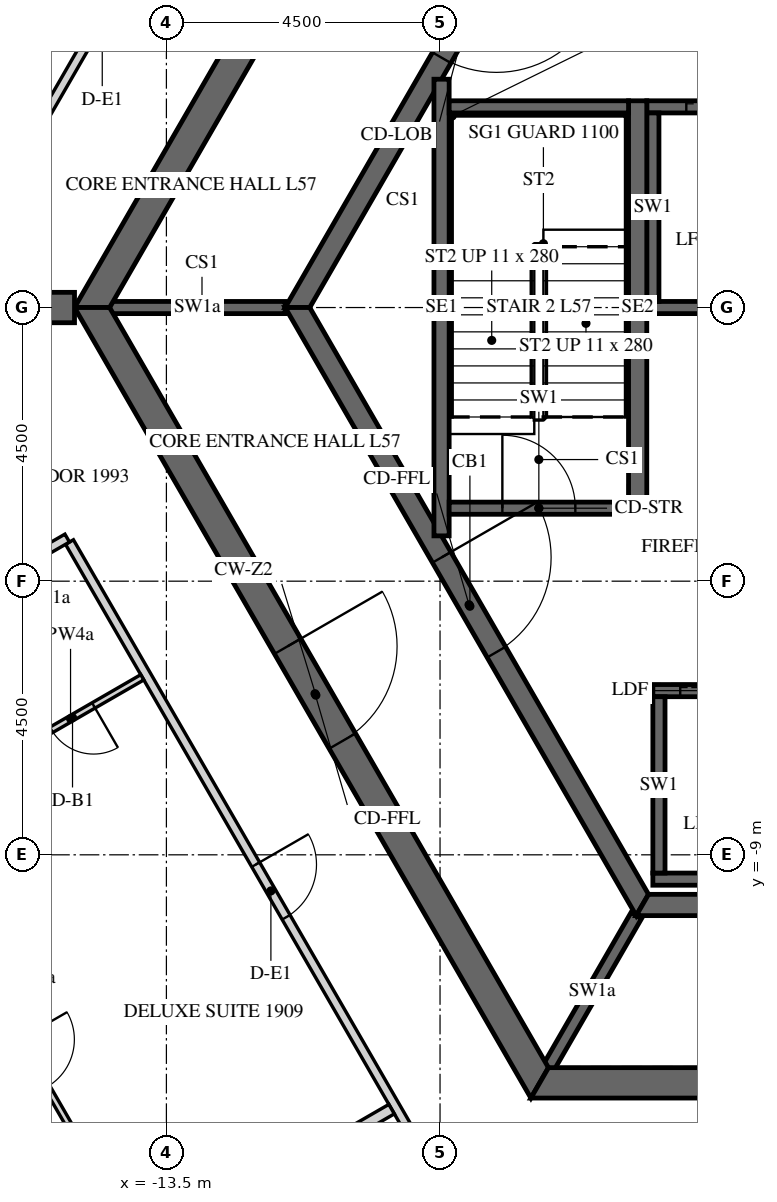
"""IFC4 building model, lengths in metres.
Left out: names, types, materials, properties, quantities, classifications, styles, units other than length and angle.
Written with IfcOpenShell. Run it as: python <this file> out.ifc"""

import sys

from ifc_helpers import new_model, si_unit, direction, frame, frame_2d, origin, place, context, subcontext, project, spatial, polyline, rectangle, outline, extrude, element, fill, save


model = new_model("IFC4")
c1 = context("Model", 3, precision=1e-05, world=origin(), true_north=direction((0.0, 1.0)))
c2 = subcontext(c1, "Body", "Model", "MODEL_VIEW")
j1 = project(units=[si_unit("LENGTHUNIT", "METRE"), si_unit("PLANEANGLEUNIT", "RADIAN")], contexts=[c1])
p1 = place(None, origin())
s1 = spatial("IfcSite", under=j1, at=p1, CompositionType="ELEMENT")
p2 = place(p1, origin())
s2 = spatial("IfcBuilding", under=s1, at=p2, CompositionType="ELEMENT")
p3 = place(p2, frame((0.0, 0.0, 238.5)))
s3 = spatial("IfcBuildingStorey", under=s2, at=p3, CompositionType="ELEMENT", Elevation=238.5)
p4 = place(p3, frame((-7.361, 12.75, -0.15), z_axis=(0.0, 0.0, 1.0), x_axis=(-0.50000571537, -0.866022103989, 0.0)))
e1 = element("IfcWall", 1, at=p4, inside=s3, PredefinedType="SHEAR", context=c2, shape_type="SweptSolid", body=[
    extrude(outline(polyline([(-0.144, -0.25), (14.867, -0.25), (14.578, 0.25), (0.144, 0.25), (-0.144, -0.25)])), origin(), (0.0, 0.0, 1.0), 3.9),
])
p5 = place(p4, frame((6.49, 0.0, 0.15)))
e2 = element("IfcOpeningElement", 2, at=p5, cuts=e1, PredefinedType="OPENING", context=c2, shape_type="SweptSolid", body=[
    extrude(rectangle(XDim=1.8, YDim=2.4, at=frame_2d((0.9, 1.2))), frame((0.0, 0.26, 0.0), z_axis=(0.0, -1.0, 0.0), x_axis=(1.0, 0.0, 0.0)), (0.0, 0.0, 1.0), 0.52),
])
p6 = place(p3, frame((-14.722, 0.0, -0.15), z_axis=(0.0, 0.0, 1.0), x_axis=(0.50000571537, -0.866022103989, 0.0)))
e3 = element("IfcWall", 3, at=p6, inside=s3, PredefinedType="SHEAR", context=c2, shape_type="SweptSolid", body=[
    extrude(outline(polyline([(-0.144, -0.25), (14.867, -0.25), (14.578, 0.25), (0.144, 0.25), (-0.144, -0.25)])), origin(), (0.0, 0.0, 1.0), 3.9),
])
p7 = place(p6, frame((6.432, 0.0, 0.15)))
e4 = element("IfcOpeningElement", 4, at=p7, cuts=e3, PredefinedType="OPENING", context=c2, shape_type="SweptSolid", body=[
    extrude(rectangle(XDim=1.8, YDim=2.4, at=frame_2d((0.9, 1.2))), frame((0.0, 0.26, 0.0), z_axis=(0.0, -1.0, 0.0), x_axis=(1.0, 0.0, 0.0)), (0.0, 0.0, 1.0), 0.52),
])
p8 = place(p3, frame((-7.361, -12.75, -0.15), z_axis=(0.0, 0.0, 1.0), x_axis=(1.0, 0.0, 0.0)))
e5 = element("IfcWall", 5, at=p8, inside=s3, PredefinedType="SHEAR", context=c2, shape_type="SweptSolid", body=[
    extrude(outline(polyline([(-0.144, -0.25), (14.866, -0.25), (14.578, 0.25), (0.144, 0.25), (-0.144, -0.25)])), origin(), (0.0, 0.0, 1.0), 3.9),
])
p9 = place(p8, frame((6.761, 0.0, 0.15)))
e6 = element("IfcOpeningElement", 6, at=p9, cuts=e5, PredefinedType="OPENING", context=c2, shape_type="SweptSolid", body=[
    extrude(rectangle(XDim=1.2, YDim=2.4, at=frame_2d((0.6, 1.2))), frame((0.0, 0.26, 0.0), z_axis=(0.0, -1.0, 0.0), x_axis=(1.0, 0.0, 0.0)), (0.0, 0.0, 1.0), 0.52),
])
p10 = place(p3, frame((-15.011, 0.0, -0.15), z_axis=(0.0, 0.0, 1.0), x_axis=(-1.0, 0.0, 0.0)))
e7 = element("IfcWall", 7, at=p10, inside=s3, PredefinedType="SHEAR", context=c2, shape_type="SweptSolid", body=[
    extrude(rectangle(XDim=15.424, YDim=0.5, at=frame_2d((7.712, 0.0))), origin(), (0.0, 0.0, 1.0), 3.9),
])
p11 = place(p10, frame((6.812, 0.0, 0.15)))
e8 = element("IfcOpeningElement", 8, at=p11, cuts=e7, PredefinedType="OPENING", context=c2, shape_type="SweptSolid", body=[
    extrude(rectangle(XDim=1.8, YDim=2.4, at=frame_2d((0.9, 1.2))), frame((0.0, 0.26, 0.0), z_axis=(0.0, -1.0, 0.0), x_axis=(1.0, 0.0, 0.0)), (0.0, 0.0, 1.0), 0.52),
])
p12 = place(p3, frame((-5.673, 9.825, -0.15), z_axis=(0.0, 0.0, 1.0), x_axis=(-0.499995046907, -0.866028263435, 0.0)))
e9 = element("IfcWall", 9, at=p12, inside=s3, PredefinedType="SHEAR", context=c2, shape_type="SweptSolid", body=[
    extrude(outline(polyline([(-0.101, -0.175), (11.446, -0.175), (11.244, 0.175), (0.101, 0.175), (-0.101, -0.175)])), origin(), (0.0, 0.0, 1.0), 3.9),
])
p13 = place(p12, frame((4.801, 0.0, 0.15)))
e10 = element("IfcOpeningElement", 10, at=p13, cuts=e9, PredefinedType="OPENING", context=c2, shape_type="SweptSolid", body=[
    extrude(rectangle(XDim=1.8, YDim=2.4, at=frame_2d((0.9, 1.2))), frame((0.0, 0.185, 0.0), z_axis=(0.0, -1.0, 0.0), x_axis=(1.0, 0.0, 0.0)), (0.0, 0.0, 1.0), 0.37),
])
p14 = place(p3, frame((-11.345, 0.0, -0.15), z_axis=(0.0, 0.0, 1.0), x_axis=(0.499995046907, -0.866028263435, 0.0)))
e11 = element("IfcWall", 11, at=p14, inside=s3, PredefinedType="SHEAR", context=c2, shape_type="SweptSolid", body=[
    extrude(outline(polyline([(-0.101, -0.175), (11.446, -0.175), (11.244, 0.175), (0.101, 0.175), (-0.101, -0.175)])), origin(), (0.0, 0.0, 1.0), 3.9),
])
p15 = place(p14, frame((4.744, 0.0, 0.15)))
e12 = element("IfcOpeningElement", 12, at=p15, cuts=e11, PredefinedType="OPENING", context=c2, shape_type="SweptSolid", body=[
    extrude(rectangle(XDim=1.8, YDim=2.4, at=frame_2d((0.9, 1.2))), frame((0.0, 0.185, 0.0), z_axis=(0.0, -1.0, 0.0), x_axis=(1.0, 0.0, 0.0)), (0.0, 0.0, 1.0), 0.37),
])
p16 = place(p3, frame((-5.673, -9.825, -0.15), z_axis=(0.0, 0.0, 1.0), x_axis=(1.0, 0.0, 0.0)))
e13 = element("IfcWall", 13, at=p16, inside=s3, PredefinedType="SHEAR", context=c2, shape_type="SweptSolid", body=[
    extrude(outline(polyline([(-0.101, -0.175), (11.446, -0.175), (11.244, 0.175), (0.101, 0.175), (-0.101, -0.175)])), origin(), (0.0, 0.0, 1.0), 3.9),
])
p17 = place(p3, frame((-5.6, 3.3, -0.25), z_axis=(0.0, 0.0, 1.0), x_axis=(1.0, 0.0, 0.0)))
e14 = element("IfcWall", 14, at=p17, inside=s3, PredefinedType="SHEAR", context=c2, shape_type="SweptSolid", body=[
    extrude(rectangle(XDim=11.2, YDim=0.2, at=frame_2d((5.6, 0.0))), origin(), (0.0, 0.0, 1.0), 3.9),
])
p18 = place(p17, frame((0.65, 0.0, 0.25)))
e15 = element("IfcOpeningElement", 15, at=p18, cuts=e14, PredefinedType="OPENING", context=c2, shape_type="SweptSolid", body=[
    extrude(rectangle(XDim=1.1, YDim=2.1, at=frame_2d((0.55, 1.05))), frame((0.0, 0.11, 0.0), z_axis=(0.0, -1.0, 0.0), x_axis=(1.0, 0.0, 0.0)), (0.0, 0.0, 1.0), 0.22),
])
p19 = place(p17, frame((2.85, 0.0, 0.25)))
e16 = element("IfcOpeningElement", 16, at=p19, cuts=e14, PredefinedType="OPENING", context=c2, shape_type="SweptSolid", body=[
    extrude(rectangle(XDim=1.1, YDim=2.1, at=frame_2d((0.55, 1.05))), frame((0.0, 0.11, 0.0), z_axis=(0.0, -1.0, 0.0), x_axis=(1.0, 0.0, 0.0)), (0.0, 0.0, 1.0), 0.22),
])
p20 = place(p17, frame((5.05, 0.0, 0.25)))
e17 = element("IfcOpeningElement", 17, at=p20, cuts=e14, PredefinedType="OPENING", context=c2, shape_type="SweptSolid", body=[
    extrude(rectangle(XDim=1.1, YDim=2.1, at=frame_2d((0.55, 1.05))), frame((0.0, 0.11, 0.0), z_axis=(0.0, -1.0, 0.0), x_axis=(1.0, 0.0, 0.0)), (0.0, 0.0, 1.0), 0.22),
])
p21 = place(p17, frame((7.25, 0.0, 0.25)))
e18 = element("IfcOpeningElement", 18, at=p21, cuts=e14, PredefinedType="OPENING", context=c2, shape_type="SweptSolid", body=[
    extrude(rectangle(XDim=1.1, YDim=2.1, at=frame_2d((0.55, 1.05))), frame((0.0, 0.11, 0.0), z_axis=(0.0, -1.0, 0.0), x_axis=(1.0, 0.0, 0.0)), (0.0, 0.0, 1.0), 0.22),
])
p22 = place(p17, frame((9.45, 0.0, 0.25)))
e19 = element("IfcOpeningElement", 19, at=p22, cuts=e14, PredefinedType="OPENING", context=c2, shape_type="SweptSolid", body=[
    extrude(rectangle(XDim=1.1, YDim=2.1, at=frame_2d((0.55, 1.05))), frame((0.0, 0.11, 0.0), z_axis=(0.0, -1.0, 0.0), x_axis=(1.0, 0.0, 0.0)), (0.0, 0.0, 1.0), 0.22),
])
p23 = place(p3, frame((-5.6, 0.0, -0.25), z_axis=(0.0, 0.0, 1.0), x_axis=(1.0, 0.0, 0.0)))
e20 = element("IfcWall", 20, at=p23, inside=s3, PredefinedType="SHEAR", context=c2, shape_type="SweptSolid", body=[
    extrude(rectangle(XDim=11.2, YDim=0.2, at=frame_2d((5.6, 0.0))), origin(), (0.0, 0.0, 1.0), 3.9),
])
p24 = place(p3, frame((-5.5, 0.1, -0.25), z_axis=(0.0, 0.0, 1.0), x_axis=(0.0, 1.0, 0.0)))
e21 = element("IfcWall", 21, at=p24, inside=s3, PredefinedType="SHEAR", context=c2, shape_type="SweptSolid", body=[
    extrude(rectangle(XDim=3.1, YDim=0.2, at=frame_2d((1.55, 0.0))), origin(), (0.0, 0.0, 1.0), 3.9),
])
p25 = place(p3, frame((-5.5, -6.3, -0.25), z_axis=(0.0, 0.0, 1.0), x_axis=(1.0, 0.0, 0.0)))
e22 = element("IfcWall", 22, at=p25, inside=s3, PredefinedType="SHEAR", context=c2, shape_type="SweptSolid", body=[
    extrude(rectangle(XDim=9.2, YDim=0.2, at=frame_2d((4.6, 0.0))), origin(), (0.0, 0.0, 1.0), 3.9),
])
p26 = place(p25, frame((0.45, 0.0, 0.25)))
e23 = element("IfcOpeningElement", 23, at=p26, cuts=e22, PredefinedType="OPENING", context=c2, shape_type="SweptSolid", body=[
    extrude(rectangle(XDim=1.1, YDim=2.1, at=frame_2d((0.55, 1.05))), frame((0.0, 0.11, 0.0), z_axis=(0.0, -1.0, 0.0), x_axis=(1.0, 0.0, 0.0)), (0.0, 0.0, 1.0), 0.22),
])
p27 = place(p25, frame((2.25, 0.0, 0.25)))
e24 = element("IfcOpeningElement", 24, at=p27, cuts=e22, PredefinedType="OPENING", context=c2, shape_type="SweptSolid", body=[
    extrude(rectangle(XDim=1.1, YDim=2.1, at=frame_2d((0.55, 1.05))), frame((0.0, 0.11, 0.0), z_axis=(0.0, -1.0, 0.0), x_axis=(1.0, 0.0, 0.0)), (0.0, 0.0, 1.0), 0.22),
])
p28 = place(p25, frame((4.05, 0.0, 0.25)))
e25 = element("IfcOpeningElement", 25, at=p28, cuts=e22, PredefinedType="OPENING", context=c2, shape_type="SweptSolid", body=[
    extrude(rectangle(XDim=1.1, YDim=2.1, at=frame_2d((0.55, 1.05))), frame((0.0, 0.11, 0.0), z_axis=(0.0, -1.0, 0.0), x_axis=(1.0, 0.0, 0.0)), (0.0, 0.0, 1.0), 0.22),
])
p29 = place(p25, frame((5.85, 0.0, 0.25)))
e26 = element("IfcOpeningElement", 26, at=p29, cuts=e22, PredefinedType="OPENING", context=c2, shape_type="SweptSolid", body=[
    extrude(rectangle(XDim=1.1, YDim=2.1, at=frame_2d((0.55, 1.05))), frame((0.0, 0.11, 0.0), z_axis=(0.0, -1.0, 0.0), x_axis=(1.0, 0.0, 0.0)), (0.0, 0.0, 1.0), 0.22),
])
p30 = place(p25, frame((7.65, 0.0, 0.25)))
e27 = element("IfcOpeningElement", 27, at=p30, cuts=e22, PredefinedType="OPENING", context=c2, shape_type="SweptSolid", body=[
    extrude(rectangle(XDim=1.1, YDim=2.1, at=frame_2d((0.55, 1.05))), frame((0.0, 0.11, 0.0), z_axis=(0.0, -1.0, 0.0), x_axis=(1.0, 0.0, 0.0)), (0.0, 0.0, 1.0), 0.22),
])
p31 = place(p3, frame((-5.5, -9.4, -0.25), z_axis=(0.0, 0.0, 1.0), x_axis=(1.0, 0.0, 0.0)))
e28 = element("IfcWall", 28, at=p31, inside=s3, PredefinedType="SHEAR", context=c2, shape_type="SweptSolid", body=[
    extrude(rectangle(XDim=9.2, YDim=0.2, at=frame_2d((4.6, 0.0))), origin(), (0.0, 0.0, 1.0), 3.9),
])
p32 = place(p3, frame((-5.4, -9.3, -0.25), z_axis=(0.0, 0.0, 1.0), x_axis=(0.0, 1.0, 0.0)))
e29 = element("IfcWall", 29, at=p32, inside=s3, PredefinedType="SHEAR", context=c2, shape_type="SweptSolid", body=[
    extrude(rectangle(XDim=2.9, YDim=0.2, at=frame_2d((1.45, 0.0))), origin(), (0.0, 0.0, 1.0), 3.9),
])
for number, where, z_axis, x_axis in (
    (30, (-11.547, 0.0, -0.15), (0.0, 0.0, 1.0), (-1.0, 0.0, 0.0)),
    (31, (-5.773, -10.0, -0.15), (0.0, 0.0, 1.0), (-0.5, -0.866, 0.0)),
):
    element("IfcWall", number, at=place(p3, frame(where, z_axis=z_axis, x_axis=x_axis)), inside=s3, PredefinedType="SHEAR", context=c2, shape_type="SweptSolid", body=[
        extrude(rectangle(XDim=2.887, YDim=0.2, at=frame_2d((1.443, 0.0))), origin(), (0.0, 0.0, 1.0), 3.9),
    ])
p33 = place(p3, frame((-5.75, -3.4, -0.25), z_axis=(0.0, 0.0, 1.0), x_axis=(0.0, 1.0, 0.0)))
e32 = element("IfcWall", 32, at=p33, inside=s3, PredefinedType="SHEAR", context=c2, shape_type="SweptSolid", body=[
    extrude(rectangle(XDim=6.8, YDim=0.3, at=frame_2d((3.4, 0.0))), origin(), (0.0, 0.0, 1.0), 3.9),
])
p34 = place(p3, frame((-8.975, -3.755, -0.25), z_axis=(0.0, 0.0, 1.0), x_axis=(0.0, 1.0, 0.0)))
e33 = element("IfcWall", 33, at=p34, inside=s3, PredefinedType="SHEAR", context=c2, shape_type="SweptSolid", body=[
    extrude(rectangle(XDim=7.51, YDim=0.25, at=frame_2d((3.755, 0.0))), origin(), (0.0, 0.0, 1.0), 3.9),
])
p35 = place(p3, frame((-8.85, 3.3, -0.25), z_axis=(0.0, 0.0, 1.0), x_axis=(1.0, 0.0, 0.0)))
e34 = element("IfcWall", 34, at=p35, inside=s3, PredefinedType="SHEAR", context=c2, shape_type="SweptSolid", body=[
    extrude(rectangle(XDim=2.95, YDim=0.2, at=frame_2d((1.475, 0.0))), origin(), (0.0, 0.0, 1.0), 3.9),
])
p36 = place(p3, frame((-8.85, -3.3, -0.25), z_axis=(0.0, 0.0, 1.0), x_axis=(1.0, 0.0, 0.0)))
e35 = element("IfcWall", 35, at=p36, inside=s3, PredefinedType="SHEAR", context=c2, shape_type="SweptSolid", body=[
    extrude(rectangle(XDim=2.95, YDim=0.2, at=frame_2d((1.475, 0.0))), origin(), (0.0, 0.0, 1.0), 3.9),
])
p37 = place(p36, frame((0.875, 0.0, 0.25)))
e36 = element("IfcOpeningElement", 36, at=p37, cuts=e35, PredefinedType="OPENING", context=c2, shape_type="SweptSolid", body=[
    extrude(rectangle(XDim=1.2, YDim=2.4, at=frame_2d((0.6, 1.2))), frame((0.0, 0.11, 0.0), z_axis=(0.0, -1.0, 0.0), x_axis=(1.0, 0.0, 0.0)), (0.0, 0.0, 1.0), 0.22),
])
p38 = place(p3, frame((-8.673, 14.978, 0.0), z_axis=(0.0, 0.0, 1.0), x_axis=(-0.50000700621, -0.86602135871, 0.0)))
e37 = element("IfcWall", 37, at=p38, inside=s3, PredefinedType="PARTITIONING", context=c2, shape_type="SweptSolid", body=[
    extrude(rectangle(XDim=14.928, YDim=0.15, at=frame_2d((7.464, 0.0))), origin(), (0.0, 0.0, 1.0), 2.838),
])
p39 = place(p38, frame((4.454, 0.0, 0.0)))
e38 = element("IfcOpeningElement", 38, at=p39, cuts=e37, PredefinedType="OPENING", context=c2, shape_type="SweptSolid", body=[
    extrude(rectangle(XDim=1.0, YDim=2.1, at=frame_2d((0.5, 1.05))), frame((0.0, 0.085, 0.0), z_axis=(0.0, -1.0, 0.0), x_axis=(1.0, 0.0, 0.0)), (0.0, 0.0, 1.0), 0.17),
])
p40 = place(p38, frame((11.264, 0.0, 0.0)))
e39 = element("IfcOpeningElement", 39, at=p40, cuts=e37, PredefinedType="OPENING", context=c2, shape_type="SweptSolid", body=[
    extrude(rectangle(XDim=1.0, YDim=2.1, at=frame_2d((0.5, 1.05))), frame((0.0, 0.085, 0.0), z_axis=(0.0, -1.0, 0.0), x_axis=(1.0, 0.0, 0.0)), (0.0, 0.0, 1.0), 0.17),
])
p41 = place(p3, frame((-15.094, -3.856, 0.0), z_axis=(0.0, 0.0, 1.0), x_axis=(0.500006037985, -0.866021917724, 0.0)))
e40 = element("IfcWall", 40, at=p41, inside=s3, PredefinedType="PARTITIONING", context=c2, shape_type="SweptSolid", body=[
    extrude(rectangle(XDim=12.867, YDim=0.15, at=frame_2d((6.434, 0.0))), origin(), (0.0, 0.0, 1.0), 2.838),
])
p42 = place(p41, frame((6.125, 0.0, 0.0)))
e41 = element("IfcOpeningElement", 41, at=p42, cuts=e40, PredefinedType="OPENING", context=c2, shape_type="SweptSolid", body=[
    extrude(rectangle(XDim=1.0, YDim=2.1, at=frame_2d((0.5, 1.05))), frame((0.0, 0.085, 0.0), z_axis=(0.0, -1.0, 0.0), x_axis=(1.0, 0.0, 0.0)), (0.0, 0.0, 1.0), 0.17),
])
p43 = place(p3, frame((-16.49, -4.576, 0.0), z_axis=(0.0, 0.0, 1.0), x_axis=(0.865993845424, 0.5000546567, 0.0)))
e42 = element("IfcWall", 42, at=p43, inside=s3, PredefinedType="PARTITIONING", context=c2, shape_type="SweptSolid", body=[
    extrude(rectangle(XDim=1.569, YDim=0.15, at=frame_2d((0.785, 0.0))), origin(), (0.0, 0.0, 1.0), 2.838),
])
p44 = place(p3, frame((-13.896, -6.081, 0.0), z_axis=(0.0, 0.0, 1.0), x_axis=(-0.866012511928, -0.500022328685, 0.0)))
e43 = element("IfcWall", 43, at=p44, inside=s3, PredefinedType="PARTITIONING", context=c2, shape_type="SweptSolid", body=[
    extrude(rectangle(XDim=2.725, YDim=0.1, at=frame_2d((1.363, 0.0))), origin(), (0.0, 0.0, 1.0), 2.838),
])
p45 = place(p44, frame((0.925, 0.0, 0.0)))
e44 = element("IfcOpeningElement", 44, at=p45, cuts=e43, PredefinedType="OPENING", context=c2, shape_type="SweptSolid", body=[
    extrude(rectangle(XDim=0.8, YDim=2.1, at=frame_2d((0.4, 1.05))), frame((0.0, 0.06, 0.0), z_axis=(0.0, -1.0, 0.0), x_axis=(1.0, 0.0, 0.0)), (0.0, 0.0, 1.0), 0.12),
])
p46 = place(p3, frame((-17.463, -9.353, 0.0), z_axis=(0.0, 0.0, 1.0), x_axis=(0.499995846692, -0.866027801685, 0.0)))
e45 = element("IfcWall", 45, at=p46, inside=s3, PredefinedType="PARTITIONING", context=c2, shape_type="SweptSolid", body=[
    extrude(rectangle(XDim=7.06, YDim=0.1, at=frame_2d((3.53, 0.0))), origin(), (0.0, 0.0, 1.0), 2.838),
])
p47 = place(p46, frame((3.1, 0.0, 0.0)))
e46 = element("IfcOpeningElement", 46, at=p47, cuts=e45, PredefinedType="OPENING", context=c2, shape_type="SweptSolid", body=[
    extrude(rectangle(XDim=0.9, YDim=2.1, at=frame_2d((0.45, 1.05))), frame((0.0, 0.06, 0.0), z_axis=(0.0, -1.0, 0.0), x_axis=(1.0, 0.0, 0.0)), (0.0, 0.0, 1.0), 0.12),
])
p48 = place(p3, frame((-20.513, -19.37, 0.0), z_axis=(0.0, 0.0, 1.0), x_axis=(0.866024931941, 0.500000817256, 0.0)))
e47 = element("IfcWall", 47, at=p48, inside=s3, PredefinedType="PARTITIONING", context=c2, shape_type="SweptSolid", body=[
    extrude(rectangle(XDim=12.375, YDim=0.18, at=frame_2d((6.188, 0.0))), origin(), (0.0, 0.0, 1.0), 2.838),
])
p49 = place(p7, origin())
e48 = element("IfcDoor", 48, at=p49, inside=s3, OperationType="DOUBLE_DOOR_SINGLE_SWING", PredefinedType="DOOR", context=c2, shape_type="SweptSolid", body=[
    extrude(rectangle(XDim=1.8, YDim=2.4, at=frame_2d((0.9, 1.2))), frame((0.0, 0.025, 0.0), z_axis=(0.0, -1.0, 0.0), x_axis=(1.0, 0.0, 0.0)), (0.0, 0.0, 1.0), 0.05),
])
fill(e4, e48)
p50 = place(p13, origin())
e49 = element("IfcDoor", 49, at=p50, inside=s3, OperationType="DOUBLE_DOOR_SINGLE_SWING", PredefinedType="DOOR", context=c2, shape_type="SweptSolid", body=[
    extrude(rectangle(XDim=1.8, YDim=2.4, at=frame_2d((0.9, 1.2))), frame((0.0, 0.025, 0.0), z_axis=(0.0, -1.0, 0.0), x_axis=(1.0, 0.0, 0.0)), (0.0, 0.0, 1.0), 0.05),
])
fill(e10, e49)
p51 = place(p15, origin())
e50 = element("IfcDoor", 50, at=p51, inside=s3, OperationType="DOUBLE_DOOR_SINGLE_SWING", PredefinedType="DOOR", context=c2, shape_type="SweptSolid", body=[
    extrude(rectangle(XDim=1.8, YDim=2.4, at=frame_2d((0.9, 1.2))), frame((0.0, 0.025, 0.0), z_axis=(0.0, -1.0, 0.0), x_axis=(1.0, 0.0, 0.0)), (0.0, 0.0, 1.0), 0.05),
])
fill(e12, e50)
p52 = place(p37, origin())
e51 = element("IfcDoor", 51, at=p52, inside=s3, OperationType="SINGLE_SWING_LEFT", PredefinedType="DOOR", context=c2, shape_type="SweptSolid", body=[
    extrude(rectangle(XDim=1.2, YDim=2.4, at=frame_2d((0.6, 1.2))), frame((0.0, 0.025, 0.0), z_axis=(0.0, -1.0, 0.0), x_axis=(1.0, 0.0, 0.0)), (0.0, 0.0, 1.0), 0.05),
])
fill(e36, e51)
p53 = place(p18, origin())
e52 = element("IfcDoor", 52, at=p53, inside=s3, OperationType="SLIDING_TO_LEFT", PredefinedType="DOOR", context=c2, shape_type="SweptSolid", body=[
    extrude(rectangle(XDim=1.1, YDim=2.1, at=frame_2d((0.55, 1.05))), frame((0.0, 0.025, 0.0), z_axis=(0.0, -1.0, 0.0), x_axis=(1.0, 0.0, 0.0)), (0.0, 0.0, 1.0), 0.05),
])
fill(e15, e52)
p54 = place(p26, origin())
e53 = element("IfcDoor", 53, at=p54, inside=s3, OperationType="SLIDING_TO_LEFT", PredefinedType="DOOR", context=c2, shape_type="SweptSolid", body=[
    extrude(rectangle(XDim=1.1, YDim=2.1, at=frame_2d((0.55, 1.05))), frame((0.0, 0.025, 0.0), z_axis=(0.0, -1.0, 0.0), x_axis=(1.0, 0.0, 0.0)), (0.0, 0.0, 1.0), 0.05),
])
fill(e23, e53)
p55 = place(p42, origin())
e54 = element("IfcDoor", 54, at=p55, inside=s3, OperationType="SINGLE_SWING_LEFT", PredefinedType="DOOR", context=c2, shape_type="SweptSolid", body=[
    extrude(rectangle(XDim=1.0, YDim=2.1, at=frame_2d((0.5, 1.05))), frame((0.0, 0.025, 0.0), z_axis=(0.0, -1.0, 0.0), x_axis=(1.0, 0.0, 0.0)), (0.0, 0.0, 1.0), 0.05),
])
fill(e41, e54)
p56 = place(p45, origin())
e55 = element("IfcDoor", 55, at=p56, inside=s3, OperationType="SINGLE_SWING_RIGHT", PredefinedType="DOOR", context=c2, shape_type="SweptSolid", body=[
    extrude(rectangle(XDim=0.8, YDim=2.1, at=frame_2d((0.4, 1.05))), frame((0.0, 0.025, 0.0), z_axis=(0.0, -1.0, 0.0), x_axis=(1.0, 0.0, 0.0)), (0.0, 0.0, 1.0), 0.05),
])
fill(e44, e55)
save(model, sys.argv[1])
